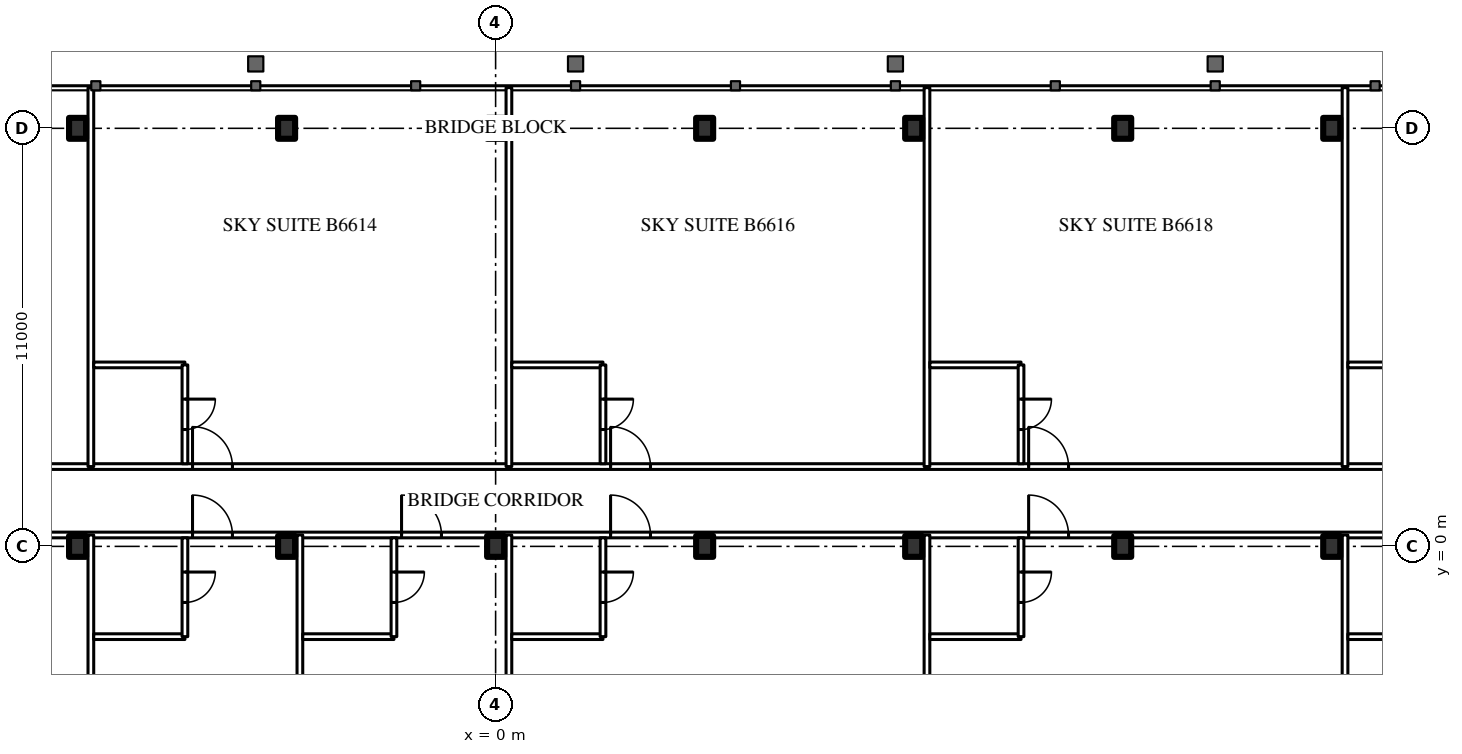
"""IFC4 building model, lengths in metres.
Left out: names, types, materials, properties, quantities, classifications, styles, units other than length and angle.
Written with IfcOpenShell. Run it as: python <this file> out.ifc"""

import sys

from ifc_helpers import new_model, si_unit, direction, frame, frame_2d, origin, origin_2d, place, context, subcontext, project, spatial, rectangle, i_section, extrude, element, fill, save


model = new_model("IFC4")
c1 = context("Model", 3, precision=1e-05, world=origin(), true_north=direction((0.0, 1.0)))
c2 = subcontext(c1, "Body", "Model", "MODEL_VIEW")
j1 = project(units=[si_unit("LENGTHUNIT", "METRE"), si_unit("PLANEANGLEUNIT", "RADIAN")], contexts=[c1])
p1 = place(None, origin())
s1 = spatial("IfcSite", under=j1, at=p1, CompositionType="ELEMENT")
p2 = place(p1, origin())
s2 = spatial("IfcBuilding", under=s1, at=p2, CompositionType="ELEMENT")
p3 = place(p2, frame((0.0, 0.0, 247.7)))
s3 = spatial("IfcBuildingStorey", under=s2, at=p3, CompositionType="ELEMENT", Elevation=247.7)
for number, where, z_axis, x_axis in (
    (1, (-11.0, 0.0, 0.0), (0.0, 0.0, 1.0), (1.0, 0.0, 0.0)),
    (2, (-5.5, 0.0, 0.0), (0.0, 0.0, 1.0), (1.0, 0.0, 0.0)),
    (3, (0.0, 0.0, 0.0), (0.0, 0.0, 1.0), (1.0, 0.0, 0.0)),
    (4, (5.5, 0.0, 0.0), (0.0, 0.0, 1.0), (1.0, 0.0, 0.0)),
    (5, (11.0, 0.0, 0.0), (0.0, 0.0, 1.0), (1.0, 0.0, 0.0)),
    (6, (16.5, 0.0, 0.0), (0.0, 0.0, 1.0), (1.0, 0.0, 0.0)),
    (7, (22.0, 0.0, 0.0), (0.0, 0.0, 1.0), (1.0, 0.0, 0.0)),
    (8, (-11.0, 11.0, 0.0), (0.0, 0.0, 1.0), (1.0, 0.0, 0.0)),
    (9, (-5.5, 11.0, 0.0), (0.0, 0.0, 1.0), (1.0, 0.0, 0.0)),
    (10, (0.0, 11.0, 0.0), (0.0, 0.0, 1.0), (1.0, 0.0, 0.0)),
    (11, (5.5, 11.0, 0.0), (0.0, 0.0, 1.0), (1.0, 0.0, 0.0)),
    (12, (11.0, 11.0, 0.0), (0.0, 0.0, 1.0), (1.0, 0.0, 0.0)),
    (13, (16.5, 11.0, 0.0), (0.0, 0.0, 1.0), (1.0, 0.0, 0.0)),
    (14, (22.0, 11.0, 0.0), (0.0, 0.0, 1.0), (1.0, 0.0, 0.0)),
):
    element("IfcColumn", number, at=place(p3, frame(where, z_axis=z_axis, x_axis=x_axis)), inside=s3, PredefinedType="COLUMN", context=c2, shape_type="SweptSolid", body=[
        extrude(i_section(OverallWidth=0.448, OverallDepth=0.55, WebThickness=0.072, FlangeThickness=0.115, FilletRadius=0.02, at=origin_2d()), origin(), (0.0, 0.0, 1.0), 4.2),
    ])
p4 = place(p3, frame((-27.5, 0.3, 0.0), z_axis=(0.0, 0.0, 1.0), x_axis=(1.0, 0.0, 0.0)))
e15 = element("IfcWall", 15, at=p4, inside=s3, PredefinedType="PARTITIONING", context=c2, shape_type="SweptSolid", body=[
    extrude(rectangle(XDim=55.0, YDim=0.15, at=frame_2d((27.5, 0.0))), origin(), (0.0, 0.0, 1.0), 3.0),
])
p5 = place(p4, frame((1.575, 0.0, 0.0)))
e16 = element("IfcOpeningElement", 16, at=p5, cuts=e15, PredefinedType="OPENING", context=c2, shape_type="SweptSolid", body=[
    extrude(rectangle(XDim=1.0, YDim=2.2, at=frame_2d((0.5, 1.1))), frame((0.0, 0.085, 0.0), z_axis=(0.0, -1.0, 0.0), x_axis=(1.0, 0.0, 0.0)), (0.0, 0.0, 1.0), 0.17),
])
p6 = place(p4, frame((8.525, 0.0, 0.0)))
e17 = element("IfcOpeningElement", 17, at=p6, cuts=e15, PredefinedType="OPENING", context=c2, shape_type="SweptSolid", body=[
    extrude(rectangle(XDim=1.05, YDim=2.4, at=frame_2d((0.525, 1.2))), frame((0.0, 0.085, 0.0), z_axis=(0.0, -1.0, 0.0), x_axis=(1.0, 0.0, 0.0)), (0.0, 0.0, 1.0), 0.17),
])
p7 = place(p4, frame((19.525, 0.0, 0.0)))
e18 = element("IfcOpeningElement", 18, at=p7, cuts=e15, PredefinedType="OPENING", context=c2, shape_type="SweptSolid", body=[
    extrude(rectangle(XDim=1.05, YDim=2.4, at=frame_2d((0.525, 1.2))), frame((0.0, 0.085, 0.0), z_axis=(0.0, -1.0, 0.0), x_axis=(1.0, 0.0, 0.0)), (0.0, 0.0, 1.0), 0.17),
])
p8 = place(p4, frame((25.025, 0.0, 0.0)))
e19 = element("IfcOpeningElement", 19, at=p8, cuts=e15, PredefinedType="OPENING", context=c2, shape_type="SweptSolid", body=[
    extrude(rectangle(XDim=1.05, YDim=2.4, at=frame_2d((0.525, 1.2))), frame((0.0, 0.085, 0.0), z_axis=(0.0, -1.0, 0.0), x_axis=(1.0, 0.0, 0.0)), (0.0, 0.0, 1.0), 0.17),
])
p9 = place(p4, frame((30.525, 0.0, 0.0)))
e20 = element("IfcOpeningElement", 20, at=p9, cuts=e15, PredefinedType="OPENING", context=c2, shape_type="SweptSolid", body=[
    extrude(rectangle(XDim=1.05, YDim=2.4, at=frame_2d((0.525, 1.2))), frame((0.0, 0.085, 0.0), z_axis=(0.0, -1.0, 0.0), x_axis=(1.0, 0.0, 0.0)), (0.0, 0.0, 1.0), 0.17),
])
p10 = place(p4, frame((41.525, 0.0, 0.0)))
e21 = element("IfcOpeningElement", 21, at=p10, cuts=e15, PredefinedType="OPENING", context=c2, shape_type="SweptSolid", body=[
    extrude(rectangle(XDim=1.05, YDim=2.4, at=frame_2d((0.525, 1.2))), frame((0.0, 0.085, 0.0), z_axis=(0.0, -1.0, 0.0), x_axis=(1.0, 0.0, 0.0)), (0.0, 0.0, 1.0), 0.17),
])
p11 = place(p4, frame((52.525, 0.0, 0.0)))
e22 = element("IfcOpeningElement", 22, at=p11, cuts=e15, PredefinedType="OPENING", context=c2, shape_type="SweptSolid", body=[
    extrude(rectangle(XDim=1.05, YDim=2.4, at=frame_2d((0.525, 1.2))), frame((0.0, 0.085, 0.0), z_axis=(0.0, -1.0, 0.0), x_axis=(1.0, 0.0, 0.0)), (0.0, 0.0, 1.0), 0.17),
])
p12 = place(p3, frame((-27.5, 2.1, 0.0), z_axis=(0.0, 0.0, 1.0), x_axis=(1.0, 0.0, 0.0)))
e23 = element("IfcWall", 23, at=p12, inside=s3, PredefinedType="PARTITIONING", context=c2, shape_type="SweptSolid", body=[
    extrude(rectangle(XDim=55.0, YDim=0.15, at=frame_2d((27.5, 0.0))), origin(), (0.0, 0.0, 1.0), 4.0),
])
p13 = place(p12, frame((2.025, 0.0, 0.0)))
e24 = element("IfcOpeningElement", 24, at=p13, cuts=e23, PredefinedType="OPENING", context=c2, shape_type="SweptSolid", body=[
    extrude(rectangle(XDim=1.05, YDim=2.4, at=frame_2d((0.525, 1.2))), frame((0.0, 0.085, 0.0), z_axis=(0.0, -1.0, 0.0), x_axis=(1.0, 0.0, 0.0)), (0.0, 0.0, 1.0), 0.17),
])
p14 = place(p12, frame((8.525, 0.0, 0.0)))
e25 = element("IfcOpeningElement", 25, at=p14, cuts=e23, PredefinedType="OPENING", context=c2, shape_type="SweptSolid", body=[
    extrude(rectangle(XDim=1.05, YDim=2.4, at=frame_2d((0.525, 1.2))), frame((0.0, 0.085, 0.0), z_axis=(0.0, -1.0, 0.0), x_axis=(1.0, 0.0, 0.0)), (0.0, 0.0, 1.0), 0.17),
])
p15 = place(p12, frame((19.525, 0.0, 0.0)))
e26 = element("IfcOpeningElement", 26, at=p15, cuts=e23, PredefinedType="OPENING", context=c2, shape_type="SweptSolid", body=[
    extrude(rectangle(XDim=1.05, YDim=2.4, at=frame_2d((0.525, 1.2))), frame((0.0, 0.085, 0.0), z_axis=(0.0, -1.0, 0.0), x_axis=(1.0, 0.0, 0.0)), (0.0, 0.0, 1.0), 0.17),
])
p16 = place(p12, frame((30.525, 0.0, 0.0)))
e27 = element("IfcOpeningElement", 27, at=p16, cuts=e23, PredefinedType="OPENING", context=c2, shape_type="SweptSolid", body=[
    extrude(rectangle(XDim=1.05, YDim=2.4, at=frame_2d((0.525, 1.2))), frame((0.0, 0.085, 0.0), z_axis=(0.0, -1.0, 0.0), x_axis=(1.0, 0.0, 0.0)), (0.0, 0.0, 1.0), 0.17),
])
p17 = place(p12, frame((41.525, 0.0, 0.0)))
e28 = element("IfcOpeningElement", 28, at=p17, cuts=e23, PredefinedType="OPENING", context=c2, shape_type="SweptSolid", body=[
    extrude(rectangle(XDim=1.05, YDim=2.4, at=frame_2d((0.525, 1.2))), frame((0.0, 0.085, 0.0), z_axis=(0.0, -1.0, 0.0), x_axis=(1.0, 0.0, 0.0)), (0.0, 0.0, 1.0), 0.17),
])
p18 = place(p12, frame((52.525, 0.0, 0.0)))
e29 = element("IfcOpeningElement", 29, at=p18, cuts=e23, PredefinedType="OPENING", context=c2, shape_type="SweptSolid", body=[
    extrude(rectangle(XDim=1.05, YDim=2.4, at=frame_2d((0.525, 1.2))), frame((0.0, 0.085, 0.0), z_axis=(0.0, -1.0, 0.0), x_axis=(1.0, 0.0, 0.0)), (0.0, 0.0, 1.0), 0.17),
])
for number, where, z_axis, x_axis in (
    (30, (-10.65, -12.07, 0.0), (0.0, 0.0, 1.0), (0.0, 1.0, 0.0)),
    (31, (-5.15, -12.07, 0.0), (0.0, 0.0, 1.0), (0.0, 1.0, 0.0)),
    (32, (0.35, -12.07, 0.0), (0.0, 0.0, 1.0), (0.0, 1.0, 0.0)),
    (33, (11.35, -12.07, 0.0), (0.0, 0.0, 1.0), (0.0, 1.0, 0.0)),
    (34, (22.35, -12.07, 0.0), (0.0, 0.0, 1.0), (0.0, 1.0, 0.0)),
):
    element("IfcWall", number, at=place(p3, frame(where, z_axis=z_axis, x_axis=x_axis)), inside=s3, PredefinedType="PARTITIONING", context=c2, shape_type="SweptSolid", body=[
        extrude(rectangle(XDim=12.37, YDim=0.15, at=frame_2d((6.185, 0.0))), origin(), (0.0, 0.0, 1.0), 4.0),
    ])
p19 = place(p3, frame((-10.575, -2.375, 0.0), z_axis=(0.0, 0.0, 1.0), x_axis=(1.0, 0.0, 0.0)))
e35 = element("IfcWall", 35, at=p19, inside=s3, PredefinedType="PARTITIONING", context=c2, shape_type="SweptSolid", body=[
    extrude(rectangle(XDim=2.4, YDim=0.15, at=frame_2d((1.2, 0.0))), origin(), (0.0, 0.0, 1.0), 4.0),
])
p20 = place(p3, frame((-8.175, -2.375, 0.0), z_axis=(0.0, 0.0, 1.0), x_axis=(0.0, 1.0, 0.0)))
e36 = element("IfcWall", 36, at=p20, inside=s3, PredefinedType="PARTITIONING", context=c2, shape_type="SweptSolid", body=[
    extrude(rectangle(XDim=2.6, YDim=0.15, at=frame_2d((1.3, 0.0))), origin(), (0.0, 0.0, 1.0), 4.0),
])
p21 = place(p20, frame((0.9, 0.0, 0.0)))
e37 = element("IfcOpeningElement", 37, at=p21, cuts=e36, PredefinedType="OPENING", context=c2, shape_type="SweptSolid", body=[
    extrude(rectangle(XDim=0.8, YDim=2.2, at=frame_2d((0.4, 1.1))), frame((0.0, 0.085, 0.0), z_axis=(0.0, -1.0, 0.0), x_axis=(1.0, 0.0, 0.0)), (0.0, 0.0, 1.0), 0.17),
])
p22 = place(p3, frame((-5.075, -2.375, 0.0), z_axis=(0.0, 0.0, 1.0), x_axis=(1.0, 0.0, 0.0)))
e38 = element("IfcWall", 38, at=p22, inside=s3, PredefinedType="PARTITIONING", context=c2, shape_type="SweptSolid", body=[
    extrude(rectangle(XDim=2.4, YDim=0.15, at=frame_2d((1.2, 0.0))), origin(), (0.0, 0.0, 1.0), 4.0),
])
p23 = place(p3, frame((-2.675, -2.375, 0.0), z_axis=(0.0, 0.0, 1.0), x_axis=(0.0, 1.0, 0.0)))
e39 = element("IfcWall", 39, at=p23, inside=s3, PredefinedType="PARTITIONING", context=c2, shape_type="SweptSolid", body=[
    extrude(rectangle(XDim=2.6, YDim=0.15, at=frame_2d((1.3, 0.0))), origin(), (0.0, 0.0, 1.0), 4.0),
])
p24 = place(p23, frame((0.9, 0.0, 0.0)))
e40 = element("IfcOpeningElement", 40, at=p24, cuts=e39, PredefinedType="OPENING", context=c2, shape_type="SweptSolid", body=[
    extrude(rectangle(XDim=0.8, YDim=2.2, at=frame_2d((0.4, 1.1))), frame((0.0, 0.085, 0.0), z_axis=(0.0, -1.0, 0.0), x_axis=(1.0, 0.0, 0.0)), (0.0, 0.0, 1.0), 0.17),
])
p25 = place(p3, frame((0.425, -2.375, 0.0), z_axis=(0.0, 0.0, 1.0), x_axis=(1.0, 0.0, 0.0)))
e41 = element("IfcWall", 41, at=p25, inside=s3, PredefinedType="PARTITIONING", context=c2, shape_type="SweptSolid", body=[
    extrude(rectangle(XDim=2.4, YDim=0.15, at=frame_2d((1.2, 0.0))), origin(), (0.0, 0.0, 1.0), 4.0),
])
p26 = place(p3, frame((2.825, -2.375, 0.0), z_axis=(0.0, 0.0, 1.0), x_axis=(0.0, 1.0, 0.0)))
e42 = element("IfcWall", 42, at=p26, inside=s3, PredefinedType="PARTITIONING", context=c2, shape_type="SweptSolid", body=[
    extrude(rectangle(XDim=2.6, YDim=0.15, at=frame_2d((1.3, 0.0))), origin(), (0.0, 0.0, 1.0), 4.0),
])
p27 = place(p26, frame((0.9, 0.0, 0.0)))
e43 = element("IfcOpeningElement", 43, at=p27, cuts=e42, PredefinedType="OPENING", context=c2, shape_type="SweptSolid", body=[
    extrude(rectangle(XDim=0.8, YDim=2.2, at=frame_2d((0.4, 1.1))), frame((0.0, 0.085, 0.0), z_axis=(0.0, -1.0, 0.0), x_axis=(1.0, 0.0, 0.0)), (0.0, 0.0, 1.0), 0.17),
])
p28 = place(p3, frame((11.425, -2.375, 0.0), z_axis=(0.0, 0.0, 1.0), x_axis=(1.0, 0.0, 0.0)))
e44 = element("IfcWall", 44, at=p28, inside=s3, PredefinedType="PARTITIONING", context=c2, shape_type="SweptSolid", body=[
    extrude(rectangle(XDim=2.4, YDim=0.15, at=frame_2d((1.2, 0.0))), origin(), (0.0, 0.0, 1.0), 4.0),
])
p29 = place(p3, frame((13.825, -2.375, 0.0), z_axis=(0.0, 0.0, 1.0), x_axis=(0.0, 1.0, 0.0)))
e45 = element("IfcWall", 45, at=p29, inside=s3, PredefinedType="PARTITIONING", context=c2, shape_type="SweptSolid", body=[
    extrude(rectangle(XDim=2.6, YDim=0.15, at=frame_2d((1.3, 0.0))), origin(), (0.0, 0.0, 1.0), 4.0),
])
p30 = place(p29, frame((0.9, 0.0, 0.0)))
e46 = element("IfcOpeningElement", 46, at=p30, cuts=e45, PredefinedType="OPENING", context=c2, shape_type="SweptSolid", body=[
    extrude(rectangle(XDim=0.8, YDim=2.2, at=frame_2d((0.4, 1.1))), frame((0.0, 0.085, 0.0), z_axis=(0.0, -1.0, 0.0), x_axis=(1.0, 0.0, 0.0)), (0.0, 0.0, 1.0), 0.17),
])
p31 = place(p3, frame((22.425, -2.375, 0.0), z_axis=(0.0, 0.0, 1.0), x_axis=(1.0, 0.0, 0.0)))
e47 = element("IfcWall", 47, at=p31, inside=s3, PredefinedType="PARTITIONING", context=c2, shape_type="SweptSolid", body=[
    extrude(rectangle(XDim=2.4, YDim=0.15, at=frame_2d((1.2, 0.0))), origin(), (0.0, 0.0, 1.0), 4.0),
])
for number, where, z_axis, x_axis in (
    (48, (-10.65, 2.1, 0.0), (0.0, 0.0, 1.0), (0.0, 1.0, 0.0)),
    (49, (0.35, 2.1, 0.0), (0.0, 0.0, 1.0), (0.0, 1.0, 0.0)),
    (50, (11.35, 2.1, 0.0), (0.0, 0.0, 1.0), (0.0, 1.0, 0.0)),
    (51, (22.35, 2.1, 0.0), (0.0, 0.0, 1.0), (0.0, 1.0, 0.0)),
):
    element("IfcWall", number, at=place(p3, frame(where, z_axis=z_axis, x_axis=x_axis)), inside=s3, PredefinedType="PARTITIONING", context=c2, shape_type="SweptSolid", body=[
        extrude(rectangle(XDim=9.97, YDim=0.15, at=frame_2d((4.985, 0.0))), origin(), (0.0, 0.0, 1.0), 4.0),
    ])
p32 = place(p3, frame((-10.575, 4.775, 0.0), z_axis=(0.0, 0.0, 1.0), x_axis=(1.0, 0.0, 0.0)))
e52 = element("IfcWall", 52, at=p32, inside=s3, PredefinedType="PARTITIONING", context=c2, shape_type="SweptSolid", body=[
    extrude(rectangle(XDim=2.4, YDim=0.15, at=frame_2d((1.2, 0.0))), origin(), (0.0, 0.0, 1.0), 4.0),
])
p33 = place(p3, frame((-8.175, 2.175, 0.0), z_axis=(0.0, 0.0, 1.0), x_axis=(0.0, 1.0, 0.0)))
e53 = element("IfcWall", 53, at=p33, inside=s3, PredefinedType="PARTITIONING", context=c2, shape_type="SweptSolid", body=[
    extrude(rectangle(XDim=2.6, YDim=0.15, at=frame_2d((1.3, 0.0))), origin(), (0.0, 0.0, 1.0), 4.0),
])
p34 = place(p33, frame((0.9, 0.0, 0.0)))
e54 = element("IfcOpeningElement", 54, at=p34, cuts=e53, PredefinedType="OPENING", context=c2, shape_type="SweptSolid", body=[
    extrude(rectangle(XDim=0.8, YDim=2.2, at=frame_2d((0.4, 1.1))), frame((0.0, 0.085, 0.0), z_axis=(0.0, -1.0, 0.0), x_axis=(1.0, 0.0, 0.0)), (0.0, 0.0, 1.0), 0.17),
])
p35 = place(p3, frame((0.425, 4.775, 0.0), z_axis=(0.0, 0.0, 1.0), x_axis=(1.0, 0.0, 0.0)))
e55 = element("IfcWall", 55, at=p35, inside=s3, PredefinedType="PARTITIONING", context=c2, shape_type="SweptSolid", body=[
    extrude(rectangle(XDim=2.4, YDim=0.15, at=frame_2d((1.2, 0.0))), origin(), (0.0, 0.0, 1.0), 4.0),
])
p36 = place(p3, frame((2.825, 2.175, 0.0), z_axis=(0.0, 0.0, 1.0), x_axis=(0.0, 1.0, 0.0)))
e56 = element("IfcWall", 56, at=p36, inside=s3, PredefinedType="PARTITIONING", context=c2, shape_type="SweptSolid", body=[
    extrude(rectangle(XDim=2.6, YDim=0.15, at=frame_2d((1.3, 0.0))), origin(), (0.0, 0.0, 1.0), 4.0),
])
p37 = place(p36, frame((0.9, 0.0, 0.0)))
e57 = element("IfcOpeningElement", 57, at=p37, cuts=e56, PredefinedType="OPENING", context=c2, shape_type="SweptSolid", body=[
    extrude(rectangle(XDim=0.8, YDim=2.2, at=frame_2d((0.4, 1.1))), frame((0.0, 0.085, 0.0), z_axis=(0.0, -1.0, 0.0), x_axis=(1.0, 0.0, 0.0)), (0.0, 0.0, 1.0), 0.17),
])
p38 = place(p3, frame((11.425, 4.775, 0.0), z_axis=(0.0, 0.0, 1.0), x_axis=(1.0, 0.0, 0.0)))
e58 = element("IfcWall", 58, at=p38, inside=s3, PredefinedType="PARTITIONING", context=c2, shape_type="SweptSolid", body=[
    extrude(rectangle(XDim=2.4, YDim=0.15, at=frame_2d((1.2, 0.0))), origin(), (0.0, 0.0, 1.0), 4.0),
])
p39 = place(p3, frame((13.825, 2.175, 0.0), z_axis=(0.0, 0.0, 1.0), x_axis=(0.0, 1.0, 0.0)))
e59 = element("IfcWall", 59, at=p39, inside=s3, PredefinedType="PARTITIONING", context=c2, shape_type="SweptSolid", body=[
    extrude(rectangle(XDim=2.6, YDim=0.15, at=frame_2d((1.3, 0.0))), origin(), (0.0, 0.0, 1.0), 4.0),
])
p40 = place(p39, frame((0.9, 0.0, 0.0)))
e60 = element("IfcOpeningElement", 60, at=p40, cuts=e59, PredefinedType="OPENING", context=c2, shape_type="SweptSolid", body=[
    extrude(rectangle(XDim=0.8, YDim=2.2, at=frame_2d((0.4, 1.1))), frame((0.0, 0.085, 0.0), z_axis=(0.0, -1.0, 0.0), x_axis=(1.0, 0.0, 0.0)), (0.0, 0.0, 1.0), 0.17),
])
p41 = place(p3, frame((22.425, 4.775, 0.0), z_axis=(0.0, 0.0, 1.0), x_axis=(1.0, 0.0, 0.0)))
e61 = element("IfcWall", 61, at=p41, inside=s3, PredefinedType="PARTITIONING", context=c2, shape_type="SweptSolid", body=[
    extrude(rectangle(XDim=2.4, YDim=0.15, at=frame_2d((1.2, 0.0))), origin(), (0.0, 0.0, 1.0), 4.0),
])
p42 = place(p21, origin())
e62 = element("IfcDoor", 62, at=p42, inside=s3, OperationType="SINGLE_SWING_RIGHT", PredefinedType="DOOR", context=c2, shape_type="SweptSolid", body=[
    extrude(rectangle(XDim=0.8, YDim=2.2, at=frame_2d((0.4, 1.1))), frame((0.0, 0.025, 0.0), z_axis=(0.0, -1.0, 0.0), x_axis=(1.0, 0.0, 0.0)), (0.0, 0.0, 1.0), 0.05),
])
fill(e37, e62)
p43 = place(p7, origin())
e63 = element("IfcDoor", 63, at=p43, inside=s3, OperationType="SINGLE_SWING_LEFT", PredefinedType="DOOR", context=c2, shape_type="SweptSolid", body=[
    extrude(rectangle(XDim=1.05, YDim=2.4, at=frame_2d((0.525, 1.2))), frame((0.0, 0.025, 0.0), z_axis=(0.0, -1.0, 0.0), x_axis=(1.0, 0.0, 0.0)), (0.0, 0.0, 1.0), 0.05),
])
fill(e18, e63)
p44 = place(p24, origin())
e64 = element("IfcDoor", 64, at=p44, inside=s3, OperationType="SINGLE_SWING_RIGHT", PredefinedType="DOOR", context=c2, shape_type="SweptSolid", body=[
    extrude(rectangle(XDim=0.8, YDim=2.2, at=frame_2d((0.4, 1.1))), frame((0.0, 0.025, 0.0), z_axis=(0.0, -1.0, 0.0), x_axis=(1.0, 0.0, 0.0)), (0.0, 0.0, 1.0), 0.05),
])
fill(e40, e64)
p45 = place(p8, origin())
e65 = element("IfcDoor", 65, at=p45, inside=s3, OperationType="SINGLE_SWING_LEFT", PredefinedType="DOOR", context=c2, shape_type="SweptSolid", body=[
    extrude(rectangle(XDim=1.05, YDim=2.4, at=frame_2d((0.525, 1.2))), frame((0.0, 0.025, 0.0), z_axis=(0.0, -1.0, 0.0), x_axis=(1.0, 0.0, 0.0)), (0.0, 0.0, 1.0), 0.05),
])
fill(e19, e65)
p46 = place(p27, origin())
e66 = element("IfcDoor", 66, at=p46, inside=s3, OperationType="SINGLE_SWING_RIGHT", PredefinedType="DOOR", context=c2, shape_type="SweptSolid", body=[
    extrude(rectangle(XDim=0.8, YDim=2.2, at=frame_2d((0.4, 1.1))), frame((0.0, 0.025, 0.0), z_axis=(0.0, -1.0, 0.0), x_axis=(1.0, 0.0, 0.0)), (0.0, 0.0, 1.0), 0.05),
])
fill(e43, e66)
p47 = place(p9, origin())
e67 = element("IfcDoor", 67, at=p47, inside=s3, OperationType="SINGLE_SWING_LEFT", PredefinedType="DOOR", context=c2, shape_type="SweptSolid", body=[
    extrude(rectangle(XDim=1.05, YDim=2.4, at=frame_2d((0.525, 1.2))), frame((0.0, 0.025, 0.0), z_axis=(0.0, -1.0, 0.0), x_axis=(1.0, 0.0, 0.0)), (0.0, 0.0, 1.0), 0.05),
])
fill(e20, e67)
p48 = place(p30, origin())
e68 = element("IfcDoor", 68, at=p48, inside=s3, OperationType="SINGLE_SWING_RIGHT", PredefinedType="DOOR", context=c2, shape_type="SweptSolid", body=[
    extrude(rectangle(XDim=0.8, YDim=2.2, at=frame_2d((0.4, 1.1))), frame((0.0, 0.025, 0.0), z_axis=(0.0, -1.0, 0.0), x_axis=(1.0, 0.0, 0.0)), (0.0, 0.0, 1.0), 0.05),
])
fill(e46, e68)
p49 = place(p10, origin())
e69 = element("IfcDoor", 69, at=p49, inside=s3, OperationType="SINGLE_SWING_LEFT", PredefinedType="DOOR", context=c2, shape_type="SweptSolid", body=[
    extrude(rectangle(XDim=1.05, YDim=2.4, at=frame_2d((0.525, 1.2))), frame((0.0, 0.025, 0.0), z_axis=(0.0, -1.0, 0.0), x_axis=(1.0, 0.0, 0.0)), (0.0, 0.0, 1.0), 0.05),
])
fill(e21, e69)
p50 = place(p34, origin())
e70 = element("IfcDoor", 70, at=p50, inside=s3, OperationType="SINGLE_SWING_RIGHT", PredefinedType="DOOR", context=c2, shape_type="SweptSolid", body=[
    extrude(rectangle(XDim=0.8, YDim=2.2, at=frame_2d((0.4, 1.1))), frame((0.0, 0.025, 0.0), z_axis=(0.0, -1.0, 0.0), x_axis=(1.0, 0.0, 0.0)), (0.0, 0.0, 1.0), 0.05),
])
fill(e54, e70)
p51 = place(p15, origin())
e71 = element("IfcDoor", 71, at=p51, inside=s3, OperationType="SINGLE_SWING_LEFT", PredefinedType="DOOR", context=c2, shape_type="SweptSolid", body=[
    extrude(rectangle(XDim=1.05, YDim=2.4, at=frame_2d((0.525, 1.2))), frame((0.0, 0.025, 0.0), z_axis=(0.0, -1.0, 0.0), x_axis=(1.0, 0.0, 0.0)), (0.0, 0.0, 1.0), 0.05),
])
fill(e26, e71)
p52 = place(p37, origin())
e72 = element("IfcDoor", 72, at=p52, inside=s3, OperationType="SINGLE_SWING_RIGHT", PredefinedType="DOOR", context=c2, shape_type="SweptSolid", body=[
    extrude(rectangle(XDim=0.8, YDim=2.2, at=frame_2d((0.4, 1.1))), frame((0.0, 0.025, 0.0), z_axis=(0.0, -1.0, 0.0), x_axis=(1.0, 0.0, 0.0)), (0.0, 0.0, 1.0), 0.05),
])
fill(e57, e72)
p53 = place(p16, origin())
e73 = element("IfcDoor", 73, at=p53, inside=s3, OperationType="SINGLE_SWING_LEFT", PredefinedType="DOOR", context=c2, shape_type="SweptSolid", body=[
    extrude(rectangle(XDim=1.05, YDim=2.4, at=frame_2d((0.525, 1.2))), frame((0.0, 0.025, 0.0), z_axis=(0.0, -1.0, 0.0), x_axis=(1.0, 0.0, 0.0)), (0.0, 0.0, 1.0), 0.05),
])
fill(e27, e73)
p54 = place(p40, origin())
e74 = element("IfcDoor", 74, at=p54, inside=s3, OperationType="SINGLE_SWING_RIGHT", PredefinedType="DOOR", context=c2, shape_type="SweptSolid", body=[
    extrude(rectangle(XDim=0.8, YDim=2.2, at=frame_2d((0.4, 1.1))), frame((0.0, 0.025, 0.0), z_axis=(0.0, -1.0, 0.0), x_axis=(1.0, 0.0, 0.0)), (0.0, 0.0, 1.0), 0.05),
])
fill(e60, e74)
p55 = place(p17, origin())
e75 = element("IfcDoor", 75, at=p55, inside=s3, OperationType="SINGLE_SWING_LEFT", PredefinedType="DOOR", context=c2, shape_type="SweptSolid", body=[
    extrude(rectangle(XDim=1.05, YDim=2.4, at=frame_2d((0.525, 1.2))), frame((0.0, 0.025, 0.0), z_axis=(0.0, -1.0, 0.0), x_axis=(1.0, 0.0, 0.0)), (0.0, 0.0, 1.0), 0.05),
])
fill(e28, e75)
save(model, sys.argv[1])
